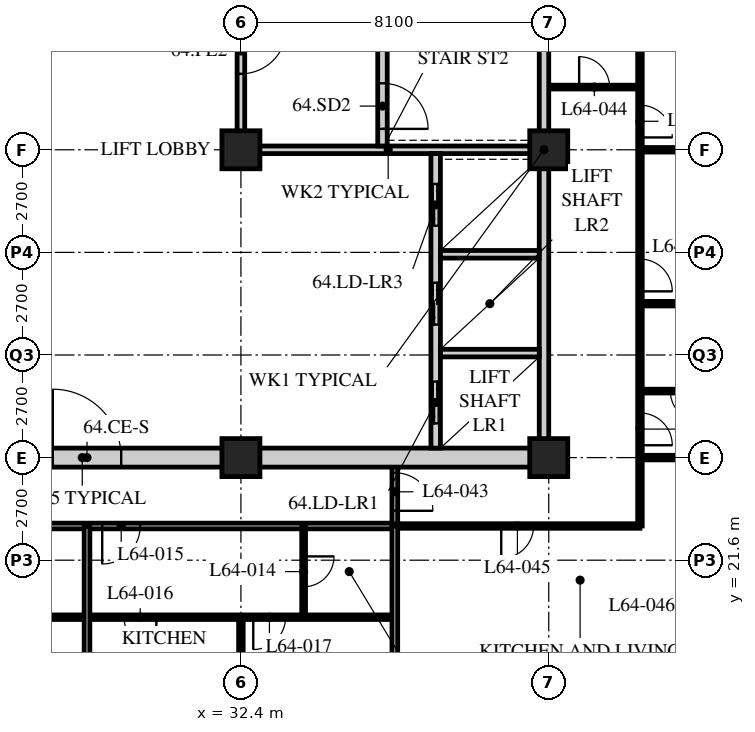
"""IFC4 building model, lengths in metres.
Left out: names, types, materials, properties, quantities, classifications, styles, units other than length and angle.
Written with IfcOpenShell. Run it as: python <this file> out.ifc"""

import sys

from ifc_helpers import new_model, si_unit, direction, frame, frame_2d, origin, origin_2d, place, context, subcontext, project, spatial, rectangle, hollow_rectangle, extrude, element, fill, save


model = new_model("IFC4")
c1 = context("Model", 3, precision=1e-05, world=origin(), true_north=direction((0.0, 1.0)))
c2 = subcontext(c1, "Body", "Model", "MODEL_VIEW")
j1 = project(units=[si_unit("LENGTHUNIT", "METRE"), si_unit("PLANEANGLEUNIT", "RADIAN")], contexts=[c1])
p1 = place(None, origin())
s1 = spatial("IfcSite", under=j1, at=p1, CompositionType="ELEMENT")
p2 = place(p1, origin())
s2 = spatial("IfcBuilding", under=s1, at=p2, CompositionType="ELEMENT")
p3 = place(p2, frame((0.0, 0.0, 250.2)))
s3 = spatial("IfcBuildingStorey", under=s2, at=p3, CompositionType="ELEMENT", Elevation=250.2)
for number, where, z_axis, x_axis in (
    (1, (32.4, 24.3, 0.0), (0.0, 0.0, 1.0), (1.0, 0.0, 0.0)),
    (2, (32.4, 32.4, 0.0), (0.0, 0.0, 1.0), (1.0, 0.0, 0.0)),
    (3, (40.5, 24.3, 0.0), (0.0, 0.0, 1.0), (1.0, 0.0, 0.0)),
    (4, (40.5, 32.4, 0.0), (0.0, 0.0, 1.0), (1.0, 0.0, 0.0)),
):
    element("IfcColumn", number, at=place(p3, frame(where, z_axis=z_axis, x_axis=x_axis)), inside=s3, PredefinedType="COLUMN", context=c2, shape_type="SweptSolid", body=[
        extrude(hollow_rectangle(XDim=1.0, YDim=1.0, WallThickness=0.1, at=origin_2d()), origin(), (0.0, 0.0, 1.0), 3.9),
    ])
p4 = place(p3, frame((12.15, 22.5, 0.0), z_axis=(0.0, 0.0, 1.0), x_axis=(1.0, 0.0, 0.0)))
e5 = element("IfcWall", 5, at=p4, inside=s3, PredefinedType="PARTITIONING", context=c2, shape_type="SweptSolid", body=[
    extrude(rectangle(XDim=24.3, YDim=0.15, at=frame_2d((12.15, 0.0))), origin(), (0.0, 0.0, 1.0), 3.69),
])
p5 = place(p4, frame((6.4, 0.0, 0.0)))
e6 = element("IfcOpeningElement", 6, at=p5, cuts=e5, PredefinedType="OPENING", context=c2, shape_type="SweptSolid", body=[
    extrude(rectangle(XDim=1.0, YDim=2.1, at=frame_2d((0.5, 1.05))), frame((0.0, 0.085, 0.0), z_axis=(0.0, -1.0, 0.0), x_axis=(1.0, 0.0, 0.0)), (0.0, 0.0, 1.0), 0.17),
])
p6 = place(p4, frame((8.5, 0.0, 0.0)))
e7 = element("IfcOpeningElement", 7, at=p6, cuts=e5, PredefinedType="OPENING", context=c2, shape_type="SweptSolid", body=[
    extrude(rectangle(XDim=1.0, YDim=2.1, at=frame_2d((0.5, 1.05))), frame((0.0, 0.085, 0.0), z_axis=(0.0, -1.0, 0.0), x_axis=(1.0, 0.0, 0.0)), (0.0, 0.0, 1.0), 0.17),
])
p7 = place(p4, frame((16.6, 0.0, 0.0)))
e8 = element("IfcOpeningElement", 8, at=p7, cuts=e5, PredefinedType="OPENING", context=c2, shape_type="SweptSolid", body=[
    extrude(rectangle(XDim=1.0, YDim=2.1, at=frame_2d((0.5, 1.05))), frame((0.0, 0.085, 0.0), z_axis=(0.0, -1.0, 0.0), x_axis=(1.0, 0.0, 0.0)), (0.0, 0.0, 1.0), 0.17),
])
p8 = place(p4, frame((2.625, 0.0, 0.0)))
e9 = element("IfcOpeningElement", 9, at=p8, cuts=e5, PredefinedType="OPENING", context=c2, shape_type="SweptSolid", body=[
    extrude(rectangle(XDim=1.0, YDim=2.1, at=frame_2d((0.5, 1.05))), frame((0.0, 0.085, 0.0), z_axis=(0.0, -1.0, 0.0), x_axis=(1.0, 0.0, 0.0)), (0.0, 0.0, 1.0), 0.17),
])
p9 = place(p3, frame((36.45, 22.5, 0.0), z_axis=(0.0, 0.0, 1.0), x_axis=(0.0, 1.0, 0.0)))
e10 = element("IfcWall", 10, at=p9, inside=s3, PredefinedType="PARTITIONING", context=c2, shape_type="SweptSolid", body=[
    extrude(rectangle(XDim=1.8, YDim=0.15, at=frame_2d((0.9, 0.0))), origin(), (0.0, 0.0, 1.0), 3.69),
])
p10 = place(p9, frame((0.4, 0.0, 0.0)))
e11 = element("IfcOpeningElement", 11, at=p10, cuts=e10, PredefinedType="OPENING", context=c2, shape_type="SweptSolid", body=[
    extrude(rectangle(XDim=1.0, YDim=2.1, at=frame_2d((0.5, 1.05))), frame((0.0, 0.085, 0.0), z_axis=(0.0, -1.0, 0.0), x_axis=(1.0, 0.0, 0.0)), (0.0, 0.0, 1.0), 0.17),
])
p11 = place(p3, frame((20.25, 20.1, 0.0), z_axis=(0.0, 0.0, 1.0), x_axis=(1.0, 0.0, 0.0)))
e12 = element("IfcWall", 12, at=p11, inside=s3, PredefinedType="PARTITIONING", context=c2, shape_type="SweptSolid", body=[
    extrude(rectangle(XDim=16.2, YDim=0.12, at=frame_2d((8.1, 0.0))), origin(), (0.0, 0.0, 1.0), 3.69),
])
p12 = place(p11, frame((0.975, 0.0, 0.0)))
e13 = element("IfcOpeningElement", 13, at=p12, cuts=e12, PredefinedType="OPENING", context=c2, shape_type="SweptSolid", body=[
    extrude(rectangle(XDim=0.85, YDim=2.1, at=frame_2d((0.425, 1.05))), frame((0.0, 0.07, 0.0), z_axis=(0.0, -1.0, 0.0), x_axis=(1.0, 0.0, 0.0)), (0.0, 0.0, 1.0), 0.14),
])
p13 = place(p11, frame((4.375, 0.0, 0.0)))
e14 = element("IfcOpeningElement", 14, at=p13, cuts=e12, PredefinedType="OPENING", context=c2, shape_type="SweptSolid", body=[
    extrude(rectangle(XDim=0.85, YDim=2.1, at=frame_2d((0.425, 1.05))), frame((0.0, 0.07, 0.0), z_axis=(0.0, -1.0, 0.0), x_axis=(1.0, 0.0, 0.0)), (0.0, 0.0, 1.0), 0.14),
])
p14 = place(p11, frame((9.075, 0.0, 0.0)))
e15 = element("IfcOpeningElement", 15, at=p14, cuts=e12, PredefinedType="OPENING", context=c2, shape_type="SweptSolid", body=[
    extrude(rectangle(XDim=0.85, YDim=2.1, at=frame_2d((0.425, 1.05))), frame((0.0, 0.07, 0.0), z_axis=(0.0, -1.0, 0.0), x_axis=(1.0, 0.0, 0.0)), (0.0, 0.0, 1.0), 0.14),
])
p15 = place(p11, frame((12.475, 0.0, 0.0)))
e16 = element("IfcOpeningElement", 16, at=p15, cuts=e12, PredefinedType="OPENING", context=c2, shape_type="SweptSolid", body=[
    extrude(rectangle(XDim=0.85, YDim=2.1, at=frame_2d((0.425, 1.05))), frame((0.0, 0.07, 0.0), z_axis=(0.0, -1.0, 0.0), x_axis=(1.0, 0.0, 0.0)), (0.0, 0.0, 1.0), 0.14),
])
p16 = place(p3, frame((28.35, 22.5, 0.0), z_axis=(0.0, 0.0, 1.0), x_axis=(0.0, -1.0, 0.0)))
e17 = element("IfcWall", 17, at=p16, inside=s3, PredefinedType="PARTITIONING", context=c2, shape_type="SweptSolid", body=[
    extrude(rectangle(XDim=6.0, YDim=0.15, at=frame_2d((3.0, 0.0))), origin(), (0.0, 0.0, 1.0), 3.69),
])
p17 = place(p3, frame((34.05, 22.5, 0.0), z_axis=(0.0, 0.0, 1.0), x_axis=(0.0, -1.0, 0.0)))
e18 = element("IfcWall", 18, at=p17, inside=s3, PredefinedType="PARTITIONING", context=c2, shape_type="SweptSolid", body=[
    extrude(rectangle(XDim=2.4, YDim=0.1, at=frame_2d((1.2, 0.0))), origin(), (0.0, 0.0, 1.0), 3.69),
])
p18 = place(p17, frame((0.8, 0.0, 0.0)))
e19 = element("IfcOpeningElement", 19, at=p18, cuts=e18, PredefinedType="OPENING", context=c2, shape_type="SweptSolid", body=[
    extrude(rectangle(XDim=0.8, YDim=2.1, at=frame_2d((0.4, 1.05))), frame((0.0, 0.06, 0.0), z_axis=(0.0, -1.0, 0.0), x_axis=(1.0, 0.0, 0.0)), (0.0, 0.0, 1.0), 0.12),
])
p19 = place(p3, frame((32.4, 20.1, 0.0), z_axis=(0.0, 0.0, 1.0), x_axis=(0.0, -1.0, 0.0)))
e20 = element("IfcWall", 20, at=p19, inside=s3, PredefinedType="PARTITIONING", context=c2, shape_type="SweptSolid", body=[
    extrude(rectangle(XDim=3.6, YDim=0.12, at=frame_2d((1.8, 0.0))), origin(), (0.0, 0.0, 1.0), 3.078),
])
p20 = place(p3, frame((40.5, 34.05, 0.0), z_axis=(0.0, 0.0, 1.0), x_axis=(1.0, 0.0, 0.0)))
e21 = element("IfcWall", 21, at=p20, inside=s3, PredefinedType="PARTITIONING", context=c2, shape_type="SweptSolid", body=[
    extrude(rectangle(XDim=2.4, YDim=0.1, at=frame_2d((1.2, 0.0))), origin(), (0.0, 0.0, 1.0), 3.69),
])
p21 = place(p20, frame((0.8, 0.0, 0.0)))
e22 = element("IfcOpeningElement", 22, at=p21, cuts=e21, PredefinedType="OPENING", context=c2, shape_type="SweptSolid", body=[
    extrude(rectangle(XDim=0.8, YDim=2.1, at=frame_2d((0.4, 1.05))), frame((0.0, 0.06, 0.0), z_axis=(0.0, -1.0, 0.0), x_axis=(1.0, 0.0, 0.0)), (0.0, 0.0, 1.0), 0.12),
])
p22 = place(p3, frame((42.9, 22.5, 0.0), z_axis=(0.0, 0.0, 1.0), x_axis=(0.0, 1.0, 0.0)))
e23 = element("IfcWall", 23, at=p22, inside=s3, PredefinedType="PARTITIONING", context=c2, shape_type="SweptSolid", body=[
    extrude(rectangle(XDim=13.95, YDim=0.12, at=frame_2d((6.975, 0.0))), origin(), (0.0, 0.0, 1.0), 3.69),
])
p23 = place(p22, frame((2.125, 0.0, 0.0)))
e24 = element("IfcOpeningElement", 24, at=p23, cuts=e23, PredefinedType="OPENING", context=c2, shape_type="SweptSolid", body=[
    extrude(rectangle(XDim=0.85, YDim=2.1, at=frame_2d((0.425, 1.05))), frame((0.0, 0.07, 0.0), z_axis=(0.0, -1.0, 0.0), x_axis=(1.0, 0.0, 0.0)), (0.0, 0.0, 1.0), 0.14),
])
p24 = place(p22, frame((6.175, 0.0, 0.0)))
e25 = element("IfcOpeningElement", 25, at=p24, cuts=e23, PredefinedType="OPENING", context=c2, shape_type="SweptSolid", body=[
    extrude(rectangle(XDim=0.85, YDim=2.1, at=frame_2d((0.425, 1.05))), frame((0.0, 0.07, 0.0), z_axis=(0.0, -1.0, 0.0), x_axis=(1.0, 0.0, 0.0)), (0.0, 0.0, 1.0), 0.14),
])
p25 = place(p22, frame((10.225, 0.0, 0.0)))
e26 = element("IfcOpeningElement", 26, at=p25, cuts=e23, PredefinedType="OPENING", context=c2, shape_type="SweptSolid", body=[
    extrude(rectangle(XDim=0.85, YDim=2.1, at=frame_2d((0.425, 1.05))), frame((0.0, 0.07, 0.0), z_axis=(0.0, -1.0, 0.0), x_axis=(1.0, 0.0, 0.0)), (0.0, 0.0, 1.0), 0.14),
])
p26 = place(p3, frame((36.45, 22.5, 0.0), z_axis=(0.0, 0.0, 1.0), x_axis=(1.0, 0.0, 0.0)))
e27 = element("IfcWall", 27, at=p26, inside=s3, PredefinedType="PARTITIONING", context=c2, shape_type="SweptSolid", body=[
    extrude(rectangle(XDim=6.45, YDim=0.12, at=frame_2d((3.225, 0.0))), origin(), (0.0, 0.0, 1.0), 3.69),
])
p27 = place(p26, frame((2.8, 0.0, 0.0)))
e28 = element("IfcOpeningElement", 28, at=p27, cuts=e27, PredefinedType="OPENING", context=c2, shape_type="SweptSolid", body=[
    extrude(rectangle(XDim=0.85, YDim=2.1, at=frame_2d((0.425, 1.05))), frame((0.0, 0.07, 0.0), z_axis=(0.0, -1.0, 0.0), x_axis=(1.0, 0.0, 0.0)), (0.0, 0.0, 1.0), 0.14),
])
p28 = place(p3, frame((42.9, 24.3, 0.0), z_axis=(0.0, 0.0, 1.0), x_axis=(1.0, 0.0, 0.0)))
e29 = element("IfcWall", 29, at=p28, inside=s3, PredefinedType="PARTITIONING", context=c2, shape_type="SweptSolid", body=[
    extrude(rectangle(XDim=9.45, YDim=0.12, at=frame_2d((4.725, 0.0))), origin(), (0.0, 0.0, 1.0), 3.078),
])
p29 = place(p3, frame((36.45, 16.5, 0.0), z_axis=(0.0, 0.0, 1.0), x_axis=(0.0, 1.0, 0.0)))
e30 = element("IfcWall", 30, at=p29, inside=s3, PredefinedType="PARTITIONING", context=c2, shape_type="SweptSolid", body=[
    extrude(rectangle(XDim=6.0, YDim=0.15, at=frame_2d((3.0, 0.0))), origin(), (0.0, 0.0, 1.0), 3.69),
])
p30 = place(p3, frame((42.9, 26.05, 0.0), z_axis=(0.0, 0.0, 1.0), x_axis=(1.0, 0.0, 0.0)))
e31 = element("IfcWall", 31, at=p30, inside=s3, PredefinedType="PARTITIONING", context=c2, shape_type="SweptSolid", body=[
    extrude(rectangle(XDim=2.4, YDim=0.1, at=frame_2d((1.2, 0.0))), origin(), (0.0, 0.0, 1.0), 3.69),
])
p31 = place(p30, frame((0.8, 0.0, 0.0)))
e32 = element("IfcOpeningElement", 32, at=p31, cuts=e31, PredefinedType="OPENING", context=c2, shape_type="SweptSolid", body=[
    extrude(rectangle(XDim=0.8, YDim=2.1, at=frame_2d((0.4, 1.05))), frame((0.0, 0.06, 0.0), z_axis=(0.0, -1.0, 0.0), x_axis=(1.0, 0.0, 0.0)), (0.0, 0.0, 1.0), 0.12),
])
p32 = place(p3, frame((42.9, 28.35, 0.0), z_axis=(0.0, 0.0, 1.0), x_axis=(1.0, 0.0, 0.0)))
e33 = element("IfcWall", 33, at=p32, inside=s3, PredefinedType="PARTITIONING", context=c2, shape_type="SweptSolid", body=[
    extrude(rectangle(XDim=13.5, YDim=0.12, at=frame_2d((6.75, 0.0))), origin(), (0.0, 0.0, 1.0), 3.69),
])
p33 = place(p3, frame((42.9, 32.4, 0.0), z_axis=(0.0, 0.0, 1.0), x_axis=(1.0, 0.0, 0.0)))
e34 = element("IfcWall", 34, at=p33, inside=s3, PredefinedType="PARTITIONING", context=c2, shape_type="SweptSolid", body=[
    extrude(rectangle(XDim=13.5, YDim=0.12, at=frame_2d((6.75, 0.0))), origin(), (0.0, 0.0, 1.0), 3.078),
])
p34 = place(p3, frame((15.95, 24.3, 0.0), z_axis=(0.0, 0.0, 1.0), x_axis=(1.0, 0.0, 0.0)))
e35 = element("IfcWall", 35, at=p34, inside=s3, PredefinedType="SOLIDWALL", context=c2, shape_type="SweptSolid", body=[
    extrude(rectangle(XDim=24.55, YDim=0.5, at=frame_2d((12.275, 0.0))), origin(), (0.0, 0.0, 1.0), 3.04),
])
p35 = place(p34, frame((11.5, 0.0, 0.0)))
e36 = element("IfcOpeningElement", 36, at=p35, cuts=e35, PredefinedType="OPENING", context=c2, shape_type="SweptSolid", body=[
    extrude(rectangle(XDim=1.8, YDim=2.4, at=frame_2d((0.9, 1.2))), frame((0.0, 0.26, 0.0), z_axis=(0.0, -1.0, 0.0), x_axis=(1.0, 0.0, 0.0)), (0.0, 0.0, 1.0), 0.52),
])
p36 = place(p3, frame((40.375, 24.55, 0.0), z_axis=(0.0, 0.0, 1.0), x_axis=(0.0, 1.0, 0.0)))
e37 = element("IfcWall", 37, at=p36, inside=s3, PredefinedType="SOLIDWALL", context=c2, shape_type="SweptSolid", body=[
    extrude(rectangle(XDim=15.7, YDim=0.25, at=frame_2d((7.85, 0.0))), origin(), (0.0, 0.0, 1.0), 3.078),
])
p37 = place(p3, frame((32.3, 32.4, 0.0), z_axis=(0.0, 0.0, 1.0), x_axis=(1.0, 0.0, 0.0)))
e38 = element("IfcWall", 38, at=p37, inside=s3, PredefinedType="SOLIDWALL", context=c2, shape_type="SweptSolid", body=[
    extrude(rectangle(XDim=7.95, YDim=0.2, at=frame_2d((3.975, 0.0))), origin(), (0.0, 0.0, 1.0), 3.078),
])
p38 = place(p3, frame((32.4, 32.5, 0.0), z_axis=(0.0, 0.0, 1.0), x_axis=(0.0, 1.0, 0.0)))
e39 = element("IfcWall", 39, at=p38, inside=s3, PredefinedType="SOLIDWALL", context=c2, shape_type="SweptSolid", body=[
    extrude(rectangle(XDim=7.75, YDim=0.2, at=frame_2d((3.875, 0.0))), origin(), (0.0, 0.0, 1.0), 3.078),
])
p39 = place(p38, frame((1.9, 0.0, 0.0)))
e40 = element("IfcOpeningElement", 40, at=p39, cuts=e39, PredefinedType="OPENING", context=c2, shape_type="SweptSolid", body=[
    extrude(rectangle(XDim=1.2, YDim=2.1, at=frame_2d((0.6, 1.05))), frame((0.0, 0.11, 0.0), z_axis=(0.0, -1.0, 0.0), x_axis=(1.0, 0.0, 0.0)), (0.0, 0.0, 1.0), 0.22),
])
p40 = place(p3, frame((37.525, 24.55, 0.0), z_axis=(0.0, 0.0, 1.0), x_axis=(0.0, 1.0, 0.0)))
e41 = element("IfcWall", 41, at=p40, inside=s3, PredefinedType="SOLIDWALL", context=c2, shape_type="SweptSolid", body=[
    extrude(rectangle(XDim=7.75, YDim=0.25, at=frame_2d((3.875, 0.0))), origin(), (0.0, 0.0, 1.0), 3.69),
])
p41 = place(p40, frame((0.65, 0.0, 0.0)))
e42 = element("IfcOpeningElement", 42, at=p41, cuts=e41, PredefinedType="OPENING", context=c2, shape_type="SweptSolid", body=[
    extrude(rectangle(XDim=1.1, YDim=2.4, at=frame_2d((0.55, 1.2))), frame((0.0, 0.135, 0.0), z_axis=(0.0, -1.0, 0.0), x_axis=(1.0, 0.0, 0.0)), (0.0, 0.0, 1.0), 0.27),
])
p42 = place(p40, frame((3.25, 0.0, 0.0)))
e43 = element("IfcOpeningElement", 43, at=p42, cuts=e41, PredefinedType="OPENING", context=c2, shape_type="SweptSolid", body=[
    extrude(rectangle(XDim=1.1, YDim=2.4, at=frame_2d((0.55, 1.2))), frame((0.0, 0.135, 0.0), z_axis=(0.0, -1.0, 0.0), x_axis=(1.0, 0.0, 0.0)), (0.0, 0.0, 1.0), 0.27),
])
p43 = place(p40, frame((5.85, 0.0, 0.0)))
e44 = element("IfcOpeningElement", 44, at=p43, cuts=e41, PredefinedType="OPENING", context=c2, shape_type="SweptSolid", body=[
    extrude(rectangle(XDim=1.1, YDim=2.4, at=frame_2d((0.55, 1.2))), frame((0.0, 0.135, 0.0), z_axis=(0.0, -1.0, 0.0), x_axis=(1.0, 0.0, 0.0)), (0.0, 0.0, 1.0), 0.27),
])
for number, where, z_axis, x_axis in (
    (45, (37.65, 27.05, 0.0), (0.0, 0.0, 1.0), (1.0, 0.0, 0.0)),
    (46, (37.65, 29.65, 0.0), (0.0, 0.0, 1.0), (1.0, 0.0, 0.0)),
):
    element("IfcWall", number, at=place(p3, frame(where, z_axis=z_axis, x_axis=x_axis)), inside=s3, PredefinedType="SOLIDWALL", context=c2, shape_type="SweptSolid", body=[
        extrude(rectangle(XDim=2.6, YDim=0.2, at=frame_2d((1.3, 0.0))), origin(), (0.0, 0.0, 1.0), 3.69),
    ])
p44 = place(p3, frame((36.125, 32.5, 0.0), z_axis=(0.0, 0.0, 1.0), x_axis=(0.0, 1.0, 0.0)))
e47 = element("IfcWall", 47, at=p44, inside=s3, PredefinedType="SOLIDWALL", context=c2, shape_type="SweptSolid", body=[
    extrude(rectangle(XDim=7.75, YDim=0.25, at=frame_2d((3.875, 0.0))), origin(), (0.0, 0.0, 1.0), 3.69),
])
p45 = place(p44, frame((0.45, 0.0, 0.0)))
e48 = element("IfcOpeningElement", 48, at=p45, cuts=e47, PredefinedType="OPENING", context=c2, shape_type="SweptSolid", body=[
    extrude(rectangle(XDim=1.2, YDim=2.1, at=frame_2d((0.6, 1.05))), frame((0.0, 0.135, 0.0), z_axis=(0.0, -1.0, 0.0), x_axis=(1.0, 0.0, 0.0)), (0.0, 0.0, 1.0), 0.27),
])
p46 = place(p18, origin())
e49 = element("IfcDoor", 49, at=p46, inside=s3, OperationType="SINGLE_SWING_LEFT", PredefinedType="DOOR", context=c2, shape_type="SweptSolid", body=[
    extrude(rectangle(XDim=0.8, YDim=2.1, at=frame_2d((0.4, 1.05))), frame((0.0, 0.025, 0.0), z_axis=(0.0, -1.0, 0.0), x_axis=(1.0, 0.0, 0.0)), (0.0, 0.0, 1.0), 0.05),
])
fill(e19, e49)
p47 = place(p7, origin())
e50 = element("IfcDoor", 50, at=p47, inside=s3, OperationType="SINGLE_SWING_RIGHT", PredefinedType="DOOR", context=c2, shape_type="SweptSolid", body=[
    extrude(rectangle(XDim=1.0, YDim=2.1, at=frame_2d((0.5, 1.05))), frame((0.0, 0.025, 0.0), z_axis=(0.0, -1.0, 0.0), x_axis=(1.0, 0.0, 0.0)), (0.0, 0.0, 1.0), 0.05),
])
fill(e8, e50)
p48 = place(p14, origin())
e51 = element("IfcDoor", 51, at=p48, inside=s3, OperationType="SINGLE_SWING_LEFT", PredefinedType="DOOR", context=c2, shape_type="SweptSolid", body=[
    extrude(rectangle(XDim=0.85, YDim=2.1, at=frame_2d((0.425, 1.05))), frame((0.0, 0.025, 0.0), z_axis=(0.0, -1.0, 0.0), x_axis=(1.0, 0.0, 0.0)), (0.0, 0.0, 1.0), 0.05),
])
fill(e15, e51)
p49 = place(p15, origin())
e52 = element("IfcDoor", 52, at=p49, inside=s3, OperationType="SINGLE_SWING_RIGHT", PredefinedType="DOOR", context=c2, shape_type="SweptSolid", body=[
    extrude(rectangle(XDim=0.85, YDim=2.1, at=frame_2d((0.425, 1.05))), frame((0.0, 0.025, 0.0), z_axis=(0.0, -1.0, 0.0), x_axis=(1.0, 0.0, 0.0)), (0.0, 0.0, 1.0), 0.05),
])
fill(e16, e52)
p50 = place(p10, origin())
e53 = element("IfcDoor", 53, at=p50, inside=s3, OperationType="SINGLE_SWING_RIGHT", PredefinedType="DOOR", context=c2, shape_type="SweptSolid", body=[
    extrude(rectangle(XDim=1.0, YDim=2.1, at=frame_2d((0.5, 1.05))), frame((0.0, 0.025, 0.0), z_axis=(0.0, -1.0, 0.0), x_axis=(1.0, 0.0, 0.0)), (0.0, 0.0, 1.0), 0.05),
])
fill(e11, e53)
p51 = place(p21, origin())
e54 = element("IfcDoor", 54, at=p51, inside=s3, OperationType="SINGLE_SWING_LEFT", PredefinedType="DOOR", context=c2, shape_type="SweptSolid", body=[
    extrude(rectangle(XDim=0.8, YDim=2.1, at=frame_2d((0.4, 1.05))), frame((0.0, 0.025, 0.0), z_axis=(0.0, -1.0, 0.0), x_axis=(1.0, 0.0, 0.0)), (0.0, 0.0, 1.0), 0.05),
])
fill(e22, e54)
p52 = place(p27, origin())
e55 = element("IfcDoor", 55, at=p52, inside=s3, OperationType="SINGLE_SWING_RIGHT", PredefinedType="DOOR", context=c2, shape_type="SweptSolid", body=[
    extrude(rectangle(XDim=0.85, YDim=2.1, at=frame_2d((0.425, 1.05))), frame((0.0, 0.025, 0.0), z_axis=(0.0, -1.0, 0.0), x_axis=(1.0, 0.0, 0.0)), (0.0, 0.0, 1.0), 0.05),
])
fill(e28, e55)
p53 = place(p31, origin())
e56 = element("IfcDoor", 56, at=p53, inside=s3, OperationType="SINGLE_SWING_LEFT", PredefinedType="DOOR", context=c2, shape_type="SweptSolid", body=[
    extrude(rectangle(XDim=0.8, YDim=2.1, at=frame_2d((0.4, 1.05))), frame((0.0, 0.025, 0.0), z_axis=(0.0, -1.0, 0.0), x_axis=(1.0, 0.0, 0.0)), (0.0, 0.0, 1.0), 0.05),
])
fill(e32, e56)
p54 = place(p23, origin())
e57 = element("IfcDoor", 57, at=p54, inside=s3, OperationType="SINGLE_SWING_RIGHT", PredefinedType="DOOR", context=c2, shape_type="SweptSolid", body=[
    extrude(rectangle(XDim=0.85, YDim=2.1, at=frame_2d((0.425, 1.05))), frame((0.0, 0.025, 0.0), z_axis=(0.0, -1.0, 0.0), x_axis=(1.0, 0.0, 0.0)), (0.0, 0.0, 1.0), 0.05),
])
fill(e24, e57)
p55 = place(p24, origin())
e58 = element("IfcDoor", 58, at=p55, inside=s3, OperationType="SINGLE_SWING_RIGHT", PredefinedType="DOOR", context=c2, shape_type="SweptSolid", body=[
    extrude(rectangle(XDim=0.85, YDim=2.1, at=frame_2d((0.425, 1.05))), frame((0.0, 0.025, 0.0), z_axis=(0.0, -1.0, 0.0), x_axis=(1.0, 0.0, 0.0)), (0.0, 0.0, 1.0), 0.05),
])
fill(e25, e58)
p56 = place(p25, origin())
e59 = element("IfcDoor", 59, at=p56, inside=s3, OperationType="SINGLE_SWING_RIGHT", PredefinedType="DOOR", context=c2, shape_type="SweptSolid", body=[
    extrude(rectangle(XDim=0.85, YDim=2.1, at=frame_2d((0.425, 1.05))), frame((0.0, 0.025, 0.0), z_axis=(0.0, -1.0, 0.0), x_axis=(1.0, 0.0, 0.0)), (0.0, 0.0, 1.0), 0.05),
])
fill(e26, e59)
p57 = place(p45, origin())
e60 = element("IfcDoor", 60, at=p57, inside=s3, OperationType="SINGLE_SWING_RIGHT", PredefinedType="DOOR", context=c2, shape_type="SweptSolid", body=[
    extrude(rectangle(XDim=1.2, YDim=2.1, at=frame_2d((0.6, 1.05))), frame((0.0, 0.025, 0.0), z_axis=(0.0, -1.0, 0.0), x_axis=(1.0, 0.0, 0.0)), (0.0, 0.0, 1.0), 0.05),
])
fill(e48, e60)
p58 = place(p39, origin())
e61 = element("IfcDoor", 61, at=p58, inside=s3, OperationType="SINGLE_SWING_LEFT", PredefinedType="DOOR", context=c2, shape_type="SweptSolid", body=[
    extrude(rectangle(XDim=1.2, YDim=2.1, at=frame_2d((0.6, 1.05))), frame((0.0, 0.025, 0.0), z_axis=(0.0, -1.0, 0.0), x_axis=(1.0, 0.0, 0.0)), (0.0, 0.0, 1.0), 0.05),
])
fill(e40, e61)
p59 = place(p41, origin())
e62 = element("IfcDoor", 62, at=p59, inside=s3, OperationType="DOUBLE_DOOR_SLIDING", PredefinedType="DOOR", context=c2, shape_type="SweptSolid", body=[
    extrude(rectangle(XDim=1.1, YDim=2.4, at=frame_2d((0.55, 1.2))), frame((0.0, 0.025, 0.0), z_axis=(0.0, -1.0, 0.0), x_axis=(1.0, 0.0, 0.0)), (0.0, 0.0, 1.0), 0.05),
])
fill(e42, e62)
p60 = place(p42, origin())
e63 = element("IfcDoor", 63, at=p60, inside=s3, OperationType="DOUBLE_DOOR_SLIDING", PredefinedType="DOOR", context=c2, shape_type="SweptSolid", body=[
    extrude(rectangle(XDim=1.1, YDim=2.4, at=frame_2d((0.55, 1.2))), frame((0.0, 0.025, 0.0), z_axis=(0.0, -1.0, 0.0), x_axis=(1.0, 0.0, 0.0)), (0.0, 0.0, 1.0), 0.05),
])
fill(e43, e63)
p61 = place(p43, origin())
e64 = element("IfcDoor", 64, at=p61, inside=s3, OperationType="DOUBLE_DOOR_SLIDING", PredefinedType="DOOR", context=c2, shape_type="SweptSolid", body=[
    extrude(rectangle(XDim=1.1, YDim=2.4, at=frame_2d((0.55, 1.2))), frame((0.0, 0.025, 0.0), z_axis=(0.0, -1.0, 0.0), x_axis=(1.0, 0.0, 0.0)), (0.0, 0.0, 1.0), 0.05),
])
fill(e44, e64)
p62 = place(p35, origin())
e65 = element("IfcDoor", 65, at=p62, inside=s3, OperationType="DOUBLE_DOOR_SINGLE_SWING", PredefinedType="DOOR", context=c2, shape_type="SweptSolid", body=[
    extrude(rectangle(XDim=1.8, YDim=2.4, at=frame_2d((0.9, 1.2))), frame((0.0, 0.025, 0.0), z_axis=(0.0, -1.0, 0.0), x_axis=(1.0, 0.0, 0.0)), (0.0, 0.0, 1.0), 0.05),
])
fill(e36, e65)
save(model, sys.argv[1])
